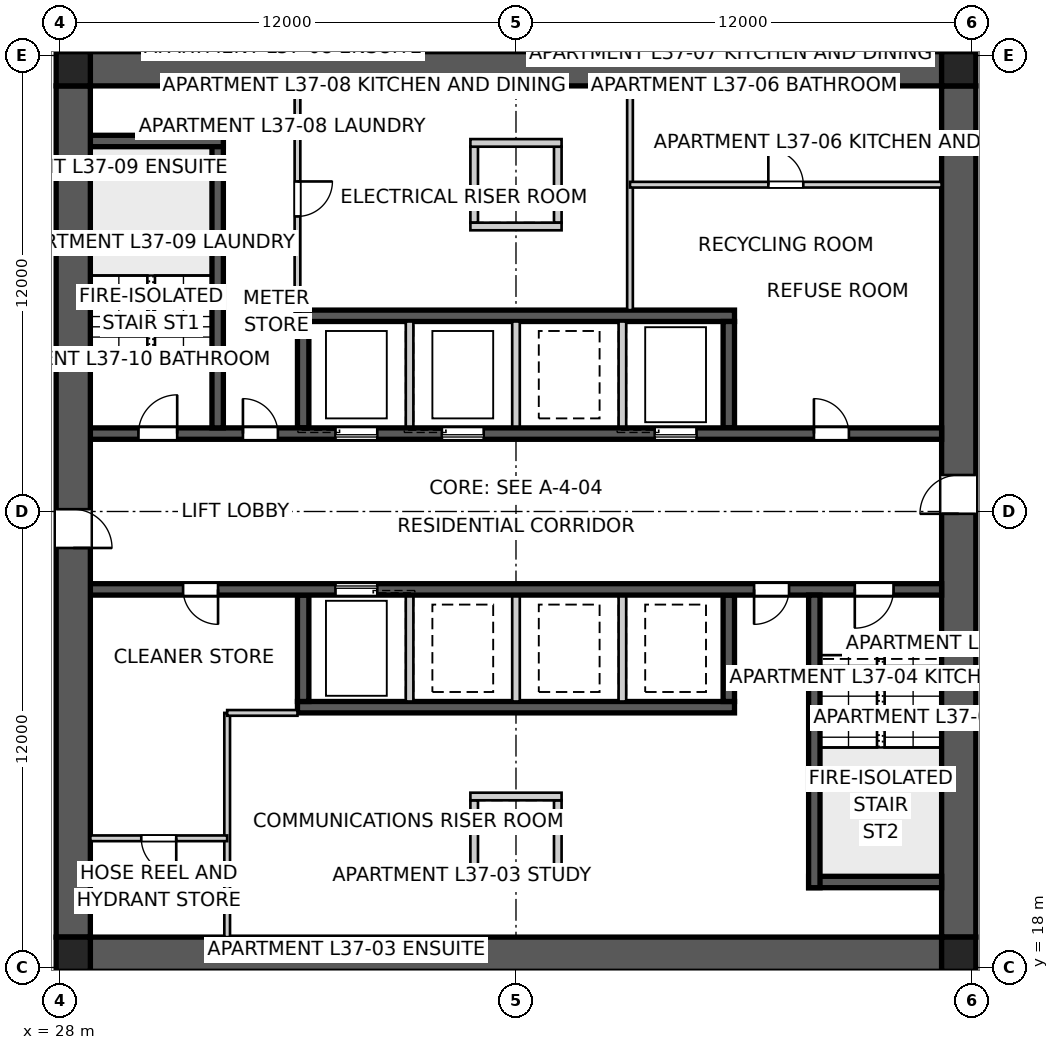
"""IFC4 building model, lengths in metres.
Left out: names, types, materials, properties, quantities, classifications, styles, units other than length and angle.
Written with IfcOpenShell. Run it as: python <this file> out.ifc"""

import sys

from ifc_helpers import new_model, si_unit, direction, frame, frame_2d, origin, origin_2d, place, context, subcontext, project, spatial, polyline, rectangle, outline, extrude, element, fill, save


model = new_model("IFC4")
c1 = context("Model", 3, precision=1e-05, world=origin(), true_north=direction((0.0, 1.0)))
c2 = subcontext(c1, "Body", "Model", "MODEL_VIEW")
j1 = project(units=[si_unit("LENGTHUNIT", "METRE"), si_unit("PLANEANGLEUNIT", "RADIAN")], contexts=[c1])
p1 = place(None, origin())
s1 = spatial("IfcSite", under=j1, at=p1, CompositionType="ELEMENT")
p2 = place(p1, origin())
s2 = spatial("IfcBuilding", under=s1, at=p2, CompositionType="ELEMENT")
p3 = place(p2, frame((0.0, 0.0, 135.4)))
s3 = spatial("IfcBuildingStorey", under=s2, at=p3, CompositionType="ELEMENT", Elevation=135.4)
for number, where, z_axis, x_axis in (
    (1, (28.8, 41.65, 0.0), (0.0, 0.0, 1.0), (1.0, 0.0, 0.0)),
    (2, (51.2, 18.35, 0.0), (0.0, 0.0, 1.0), (-1.0, 0.0, 0.0)),
):
    element("IfcWall", number, at=place(p3, frame(where, z_axis=z_axis, x_axis=x_axis)), inside=s3, PredefinedType="SHEAR", context=c2, shape_type="SweptSolid", body=[
        extrude(outline(polyline([(0.0, -0.45), (22.4, -0.45), (22.4, -0.025), (22.85, -0.025), (22.85, 0.025), (22.4, 0.025), (22.4, 0.45), (0.0, 0.45), (0.0, 0.025), (-0.45, 0.025), (-0.45, -0.025), (0.0, -0.025), (0.0, -0.45)])), origin(), (0.0, 0.0, 1.0), 3.4),
    ])
p4 = place(p3, frame((51.65, 18.8, 0.0), z_axis=(0.0, 0.0, 1.0), x_axis=(0.0, 1.0, 0.0)))
e3 = element("IfcWall", 3, at=p4, inside=s3, PredefinedType="SHEAR", context=c2, shape_type="SweptSolid", body=[
    extrude(outline(polyline([(0.0, -0.45), (22.4, -0.45), (22.4, -0.025), (22.85, -0.025), (22.85, 0.025), (22.4, 0.025), (22.4, 0.45), (0.0, 0.45), (0.0, 0.025), (-0.45, 0.025), (-0.45, -0.025), (0.0, -0.025), (0.0, -0.45)])), origin(), (0.0, 0.0, 1.0), 3.4),
])
p5 = place(p4, frame((11.14, 0.0, 0.0)))
e4 = element("IfcOpeningElement", 4, at=p5, cuts=e3, PredefinedType="OPENING", context=c2, shape_type="SweptSolid", body=[
    extrude(rectangle(XDim=1.02, YDim=2.4, at=frame_2d((0.51, 1.2))), frame((0.0, 0.46, 0.0), z_axis=(0.0, -1.0, 0.0), x_axis=(1.0, 0.0, 0.0)), (0.0, 0.0, 1.0), 0.92),
])
p6 = place(p3, frame((28.35, 41.2, 0.0), z_axis=(0.0, 0.0, 1.0), x_axis=(0.0, -1.0, 0.0)))
e5 = element("IfcWall", 5, at=p6, inside=s3, PredefinedType="SHEAR", context=c2, shape_type="SweptSolid", body=[
    extrude(outline(polyline([(0.0, -0.45), (22.4, -0.45), (22.4, -0.025), (22.85, -0.025), (22.85, 0.025), (22.4, 0.025), (22.4, 0.45), (0.0, 0.45), (0.0, 0.025), (-0.45, 0.025), (-0.45, -0.025), (0.0, -0.025), (0.0, -0.45)])), origin(), (0.0, 0.0, 1.0), 3.4),
])
p7 = place(p6, frame((11.14, 0.0, 0.0)))
e6 = element("IfcOpeningElement", 6, at=p7, cuts=e5, PredefinedType="OPENING", context=c2, shape_type="SweptSolid", body=[
    extrude(rectangle(XDim=1.02, YDim=2.4, at=frame_2d((0.51, 1.2))), frame((0.0, 0.46, 0.0), z_axis=(0.0, -1.0, 0.0), x_axis=(1.0, 0.0, 0.0)), (0.0, 0.0, 1.0), 0.92),
])
p8 = place(p3, frame((28.8, 32.05, 0.0), z_axis=(0.0, 0.0, 1.0), x_axis=(1.0, 0.0, 0.0)))
e7 = element("IfcWall", 7, at=p8, inside=s3, PredefinedType="SHEAR", context=c2, shape_type="SweptSolid", body=[
    extrude(rectangle(XDim=22.4, YDim=0.3, at=frame_2d((11.2, 0.0))), origin(), (0.0, 0.0, 1.0), 3.4),
])
p9 = place(p8, frame((19.04, 0.0, 0.0)))
e8 = element("IfcOpeningElement", 8, at=p9, cuts=e7, PredefinedType="OPENING", context=c2, shape_type="SweptSolid", body=[
    extrude(rectangle(XDim=0.92, YDim=2.1, at=frame_2d((0.46, 1.05))), frame((0.0, 0.16, 0.0), z_axis=(0.0, -1.0, 0.0), x_axis=(1.0, 0.0, 0.0)), (0.0, 0.0, 1.0), 0.32),
])
p10 = place(p8, frame((1.265, 0.0, 0.0)))
e9 = element("IfcOpeningElement", 9, at=p10, cuts=e7, PredefinedType="OPENING", context=c2, shape_type="SweptSolid", body=[
    extrude(rectangle(XDim=1.02, YDim=2.1, at=frame_2d((0.51, 1.05))), frame((0.0, 0.16, 0.0), z_axis=(0.0, -1.0, 0.0), x_axis=(1.0, 0.0, 0.0)), (0.0, 0.0, 1.0), 0.32),
])
p11 = place(p8, frame((4.015, 0.0, 0.0)))
e10 = element("IfcOpeningElement", 10, at=p11, cuts=e7, PredefinedType="OPENING", context=c2, shape_type="SweptSolid", body=[
    extrude(rectangle(XDim=0.92, YDim=2.1, at=frame_2d((0.46, 1.05))), frame((0.0, 0.16, 0.0), z_axis=(0.0, -1.0, 0.0), x_axis=(1.0, 0.0, 0.0)), (0.0, 0.0, 1.0), 0.32),
])
p12 = place(p8, frame((6.45, 0.0, 0.0)))
e11 = element("IfcOpeningElement", 11, at=p12, cuts=e7, PredefinedType="OPENING", context=c2, shape_type="SweptSolid", body=[
    extrude(rectangle(XDim=1.1, YDim=2.1, at=frame_2d((0.55, 1.05))), frame((0.0, 0.16, 0.0), z_axis=(0.0, -1.0, 0.0), x_axis=(1.0, 0.0, 0.0)), (0.0, 0.0, 1.0), 0.32),
])
p13 = place(p8, frame((9.25, 0.0, 0.0)))
e12 = element("IfcOpeningElement", 12, at=p13, cuts=e7, PredefinedType="OPENING", context=c2, shape_type="SweptSolid", body=[
    extrude(rectangle(XDim=1.1, YDim=2.1, at=frame_2d((0.55, 1.05))), frame((0.0, 0.16, 0.0), z_axis=(0.0, -1.0, 0.0), x_axis=(1.0, 0.0, 0.0)), (0.0, 0.0, 1.0), 0.32),
])
p14 = place(p8, frame((14.85, 0.0, 0.0)))
e13 = element("IfcOpeningElement", 13, at=p14, cuts=e7, PredefinedType="OPENING", context=c2, shape_type="SweptSolid", body=[
    extrude(rectangle(XDim=1.1, YDim=2.1, at=frame_2d((0.55, 1.05))), frame((0.0, 0.16, 0.0), z_axis=(0.0, -1.0, 0.0), x_axis=(1.0, 0.0, 0.0)), (0.0, 0.0, 1.0), 0.32),
])
p15 = place(p3, frame((51.2, 27.95, 0.0), z_axis=(0.0, 0.0, 1.0), x_axis=(-1.0, 0.0, 0.0)))
e14 = element("IfcWall", 14, at=p15, inside=s3, PredefinedType="SHEAR", context=c2, shape_type="SweptSolid", body=[
    extrude(rectangle(XDim=22.4, YDim=0.3, at=frame_2d((11.2, 0.0))), origin(), (0.0, 0.0, 1.0), 3.4),
])
p16 = place(p15, frame((19.04, 0.0, 0.0)))
e15 = element("IfcOpeningElement", 15, at=p16, cuts=e14, PredefinedType="OPENING", context=c2, shape_type="SweptSolid", body=[
    extrude(rectangle(XDim=0.92, YDim=2.1, at=frame_2d((0.46, 1.05))), frame((0.0, 0.16, 0.0), z_axis=(0.0, -1.0, 0.0), x_axis=(1.0, 0.0, 0.0)), (0.0, 0.0, 1.0), 0.32),
])
p17 = place(p15, frame((1.265, 0.0, 0.0)))
e16 = element("IfcOpeningElement", 16, at=p17, cuts=e14, PredefinedType="OPENING", context=c2, shape_type="SweptSolid", body=[
    extrude(rectangle(XDim=1.02, YDim=2.1, at=frame_2d((0.51, 1.05))), frame((0.0, 0.16, 0.0), z_axis=(0.0, -1.0, 0.0), x_axis=(1.0, 0.0, 0.0)), (0.0, 0.0, 1.0), 0.32),
])
p18 = place(p15, frame((4.015, 0.0, 0.0)))
e17 = element("IfcOpeningElement", 17, at=p18, cuts=e14, PredefinedType="OPENING", context=c2, shape_type="SweptSolid", body=[
    extrude(rectangle(XDim=0.92, YDim=2.1, at=frame_2d((0.46, 1.05))), frame((0.0, 0.16, 0.0), z_axis=(0.0, -1.0, 0.0), x_axis=(1.0, 0.0, 0.0)), (0.0, 0.0, 1.0), 0.32),
])
p19 = place(p15, frame((14.85, 0.0, 0.0)))
e18 = element("IfcOpeningElement", 18, at=p19, cuts=e14, PredefinedType="OPENING", context=c2, shape_type="SweptSolid", body=[
    extrude(rectangle(XDim=1.1, YDim=2.1, at=frame_2d((0.55, 1.05))), frame((0.0, 0.16, 0.0), z_axis=(0.0, -1.0, 0.0), x_axis=(1.0, 0.0, 0.0)), (0.0, 0.0, 1.0), 0.32),
])
for number, where, z_axis, x_axis in (
    (19, (34.25, 35.15, 0.0), (0.0, 0.0, 1.0), (1.0, 0.0, 0.0)),
    (20, (45.75, 24.85, 0.0), (0.0, 0.0, 1.0), (-1.0, 0.0, 0.0)),
):
    element("IfcWall", number, at=place(p3, frame(where, z_axis=z_axis, x_axis=x_axis)), inside=s3, PredefinedType="SHEAR", context=c2, shape_type="SweptSolid", body=[
        extrude(rectangle(XDim=11.5, YDim=0.3, at=frame_2d((5.75, 0.0))), origin(), (0.0, 0.0, 1.0), 3.4),
    ])
for number, where, z_axis, x_axis in (
    (21, (34.4, 32.2, 0.0), (0.0, 0.0, 1.0), (0.0, 1.0, 0.0)),
    (22, (45.6, 27.8, 0.0), (0.0, 0.0, 1.0), (0.0, -1.0, 0.0)),
):
    element("IfcWall", number, at=place(p3, frame(where, z_axis=z_axis, x_axis=x_axis)), inside=s3, PredefinedType="SHEAR", context=c2, shape_type="SweptSolid", body=[
        extrude(rectangle(XDim=2.8, YDim=0.3, at=frame_2d((1.4, 0.0))), origin(), (0.0, 0.0, 1.0), 3.4),
    ])
for number, where, z_axis, x_axis in (
    (23, (37.2, 32.2, 0.0), (0.0, 0.0, 1.0), (0.0, 1.0, 0.0)),
    (24, (42.8, 27.8, 0.0), (0.0, 0.0, 1.0), (0.0, -1.0, 0.0)),
    (25, (40.0, 32.2, 0.0), (0.0, 0.0, 1.0), (0.0, 1.0, 0.0)),
    (26, (40.0, 27.8, 0.0), (0.0, 0.0, 1.0), (0.0, -1.0, 0.0)),
    (27, (42.8, 32.2, 0.0), (0.0, 0.0, 1.0), (0.0, 1.0, 0.0)),
    (28, (37.2, 27.8, 0.0), (0.0, 0.0, 1.0), (0.0, -1.0, 0.0)),
):
    element("IfcWall", number, at=place(p3, frame(where, z_axis=z_axis, x_axis=x_axis)), inside=s3, PredefinedType="SOLIDWALL", context=c2, shape_type="SweptSolid", body=[
        extrude(rectangle(XDim=2.8, YDim=0.2, at=frame_2d((1.4, 0.0))), origin(), (0.0, 0.0, 1.0), 3.4),
    ])
for number, where, z_axis, x_axis in (
    (29, (45.6, 32.2, 0.0), (0.0, 0.0, 1.0), (0.0, 1.0, 0.0)),
    (30, (34.4, 27.8, 0.0), (0.0, 0.0, 1.0), (0.0, -1.0, 0.0)),
):
    element("IfcWall", number, at=place(p3, frame(where, z_axis=z_axis, x_axis=x_axis)), inside=s3, PredefinedType="SHEAR", context=c2, shape_type="SweptSolid", body=[
        extrude(rectangle(XDim=2.8, YDim=0.3, at=frame_2d((1.4, 0.0))), origin(), (0.0, 0.0, 1.0), 3.4),
    ])
p20 = place(p3, frame((32.15, 32.2, 0.0), z_axis=(0.0, 0.0, 1.0), x_axis=(0.0, 1.0, 0.0)))
e31 = element("IfcWall", 31, at=p20, inside=s3, PredefinedType="SHEAR", context=c2, shape_type="SweptSolid", body=[
    extrude(rectangle(XDim=7.7, YDim=0.3, at=frame_2d((3.85, 0.0))), origin(), (0.0, 0.0, 1.0), 3.4),
])
p21 = place(p3, frame((28.8, 39.75, 0.0), z_axis=(0.0, 0.0, 1.0), x_axis=(1.0, 0.0, 0.0)))
e32 = element("IfcWall", 32, at=p21, inside=s3, PredefinedType="SHEAR", context=c2, shape_type="SweptSolid", body=[
    extrude(rectangle(XDim=3.5, YDim=0.3, at=frame_2d((1.75, 0.0))), origin(), (0.0, 0.0, 1.0), 3.4),
])
p22 = place(p3, frame((47.85, 27.8, 0.0), z_axis=(0.0, 0.0, 1.0), x_axis=(0.0, -1.0, 0.0)))
e33 = element("IfcWall", 33, at=p22, inside=s3, PredefinedType="SHEAR", context=c2, shape_type="SweptSolid", body=[
    extrude(rectangle(XDim=7.7, YDim=0.3, at=frame_2d((3.85, 0.0))), origin(), (0.0, 0.0, 1.0), 3.4),
])
p23 = place(p3, frame((51.2, 20.25, 0.0), z_axis=(0.0, 0.0, 1.0), x_axis=(-1.0, 0.0, 0.0)))
e34 = element("IfcWall", 34, at=p23, inside=s3, PredefinedType="SHEAR", context=c2, shape_type="SweptSolid", body=[
    extrude(rectangle(XDim=3.5, YDim=0.3, at=frame_2d((1.75, 0.0))), origin(), (0.0, 0.0, 1.0), 3.4),
])
for number, where, z_axis, x_axis in (
    (35, (38.9, 37.6, 0.0), (0.0, 0.0, 1.0), (0.0, 1.0, 0.0)),
    (36, (41.1, 37.6, 0.0), (0.0, 0.0, 1.0), (0.0, 1.0, 0.0)),
):
    element("IfcWall", number, at=place(p3, frame(where, z_axis=z_axis, x_axis=x_axis)), inside=s3, PredefinedType="SOLIDWALL", context=c2, shape_type="SweptSolid", body=[
        extrude(rectangle(XDim=2.0, YDim=0.2, at=frame_2d((1.0, 0.0))), origin(), (0.0, 0.0, 1.0), 3.4),
    ])
for number, where, z_axis, x_axis in (
    (37, (38.8, 37.5, 0.0), (0.0, 0.0, 1.0), (1.0, 0.0, 0.0)),
    (38, (38.8, 39.7, 0.0), (0.0, 0.0, 1.0), (1.0, 0.0, 0.0)),
):
    element("IfcWall", number, at=place(p3, frame(where, z_axis=z_axis, x_axis=x_axis)), inside=s3, PredefinedType="SOLIDWALL", context=c2, shape_type="SweptSolid", body=[
        extrude(rectangle(XDim=2.4, YDim=0.2, at=frame_2d((1.2, 0.0))), origin(), (0.0, 0.0, 1.0), 3.4),
    ])
for number, where, z_axis, x_axis in (
    (39, (38.9, 22.4, 0.0), (0.0, 0.0, 1.0), (0.0, -1.0, 0.0)),
    (40, (41.1, 22.4, 0.0), (0.0, 0.0, 1.0), (0.0, -1.0, 0.0)),
):
    element("IfcWall", number, at=place(p3, frame(where, z_axis=z_axis, x_axis=x_axis)), inside=s3, PredefinedType="SOLIDWALL", context=c2, shape_type="SweptSolid", body=[
        extrude(rectangle(XDim=2.0, YDim=0.2, at=frame_2d((1.0, 0.0))), origin(), (0.0, 0.0, 1.0), 3.4),
    ])
for number, where, z_axis, x_axis in (
    (41, (38.8, 22.5, 0.0), (0.0, 0.0, 1.0), (1.0, 0.0, 0.0)),
    (42, (38.8, 20.3, 0.0), (0.0, 0.0, 1.0), (1.0, 0.0, 0.0)),
):
    element("IfcWall", number, at=place(p3, frame(where, z_axis=z_axis, x_axis=x_axis)), inside=s3, PredefinedType="SOLIDWALL", context=c2, shape_type="SweptSolid", body=[
        extrude(rectangle(XDim=2.4, YDim=0.2, at=frame_2d((1.2, 0.0))), origin(), (0.0, 0.0, 1.0), 3.4),
    ])
for number, where, z_axis, x_axis in (
    (43, (28.35, 18.35, 0.0), (0.0, 0.0, 1.0), (1.0, 0.0, 0.0)),
    (44, (51.65, 18.35, 0.0), (0.0, 0.0, 1.0), (1.0, 0.0, 0.0)),
    (45, (51.65, 41.65, 0.0), (0.0, 0.0, 1.0), (1.0, 0.0, 0.0)),
    (46, (28.35, 41.65, 0.0), (0.0, 0.0, 1.0), (1.0, 0.0, 0.0)),
):
    element("IfcColumn", number, at=place(p3, frame(where, z_axis=z_axis, x_axis=x_axis)), inside=s3, PredefinedType="COLUMN", context=c2, shape_type="SweptSolid", body=[
        extrude(rectangle(XDim=0.9, YDim=0.9, at=origin_2d()), origin(), (0.0, 0.0, 1.0), 3.4),
    ])
p24 = place(p3, frame((34.25, 41.2, 0.0), z_axis=(0.0, 0.0, 1.0), x_axis=(0.0, -1.0, 0.0)))
e47 = element("IfcWall", 47, at=p24, inside=s3, PredefinedType="SOLIDWALL", context=c2, shape_type="SweptSolid", body=[
    extrude(rectangle(XDim=5.95, YDim=0.15, at=frame_2d((2.975, 0.0))), origin(), (0.0, 0.0, 1.0), 3.2),
])
p25 = place(p24, frame((2.515, 0.0, 0.0)))
e48 = element("IfcOpeningElement", 48, at=p25, cuts=e47, PredefinedType="OPENING", context=c2, shape_type="SweptSolid", body=[
    extrude(rectangle(XDim=0.92, YDim=2.1, at=frame_2d((0.46, 1.05))), frame((0.0, 0.085, 0.0), z_axis=(0.0, -1.0, 0.0), x_axis=(1.0, 0.0, 0.0)), (0.0, 0.0, 1.0), 0.17),
])
p26 = place(p3, frame((43.0, 41.2, 0.0), z_axis=(0.0, 0.0, 1.0), x_axis=(0.0, -1.0, 0.0)))
e49 = element("IfcWall", 49, at=p26, inside=s3, PredefinedType="SOLIDWALL", context=c2, shape_type="SweptSolid", body=[
    extrude(rectangle(XDim=5.9, YDim=0.15, at=frame_2d((2.95, 0.0))), origin(), (0.0, 0.0, 1.0), 3.2),
])
p27 = place(p3, frame((43.0, 38.6, 0.0), z_axis=(0.0, 0.0, 1.0), x_axis=(1.0, 0.0, 0.0)))
e50 = element("IfcWall", 50, at=p27, inside=s3, PredefinedType="SOLIDWALL", context=c2, shape_type="SweptSolid", body=[
    extrude(rectangle(XDim=8.2, YDim=0.15, at=frame_2d((4.1, 0.0))), origin(), (0.0, 0.0, 1.0), 3.2),
])
p28 = place(p27, frame((3.64, 0.0, 0.0)))
e51 = element("IfcOpeningElement", 51, at=p28, cuts=e50, PredefinedType="OPENING", context=c2, shape_type="SweptSolid", body=[
    extrude(rectangle(XDim=0.92, YDim=2.1, at=frame_2d((0.46, 1.05))), frame((0.0, 0.085, 0.0), z_axis=(0.0, -1.0, 0.0), x_axis=(1.0, 0.0, 0.0)), (0.0, 0.0, 1.0), 0.17),
])
p29 = place(p3, frame((32.4, 18.8, 0.0), z_axis=(0.0, 0.0, 1.0), x_axis=(0.0, 1.0, 0.0)))
e52 = element("IfcWall", 52, at=p29, inside=s3, PredefinedType="SOLIDWALL", context=c2, shape_type="SweptSolid", body=[
    extrude(rectangle(XDim=5.9, YDim=0.15, at=frame_2d((2.95, 0.0))), origin(), (0.0, 0.0, 1.0), 3.2),
])
p30 = place(p3, frame((32.4, 24.7, 0.0), z_axis=(0.0, 0.0, 1.0), x_axis=(1.0, 0.0, 0.0)))
e53 = element("IfcWall", 53, at=p30, inside=s3, PredefinedType="SOLIDWALL", context=c2, shape_type="SweptSolid", body=[
    extrude(rectangle(XDim=1.85, YDim=0.15, at=frame_2d((0.925, 0.0))), origin(), (0.0, 0.0, 1.0), 3.2),
])
p31 = place(p3, frame((32.4, 21.4, 0.0), z_axis=(0.0, 0.0, 1.0), x_axis=(-1.0, 0.0, 0.0)))
e54 = element("IfcWall", 54, at=p31, inside=s3, PredefinedType="SOLIDWALL", context=c2, shape_type="SweptSolid", body=[
    extrude(rectangle(XDim=3.6, YDim=0.15, at=frame_2d((1.8, 0.0))), origin(), (0.0, 0.0, 1.0), 3.2),
])
p32 = place(p31, frame((1.34, 0.0, 0.0)))
e55 = element("IfcOpeningElement", 55, at=p32, cuts=e54, PredefinedType="OPENING", context=c2, shape_type="SweptSolid", body=[
    extrude(rectangle(XDim=0.92, YDim=2.1, at=frame_2d((0.46, 1.05))), frame((0.0, 0.085, 0.0), z_axis=(0.0, -1.0, 0.0), x_axis=(1.0, 0.0, 0.0)), (0.0, 0.0, 1.0), 0.17),
])
p33 = place(p9, origin())
e56 = element("IfcDoor", 56, at=p33, inside=s3, OperationType="SINGLE_SWING_LEFT", PredefinedType="DOOR", context=c2, shape_type="SweptSolid", body=[
    extrude(rectangle(XDim=0.92, YDim=2.1, at=frame_2d((0.46, 1.05))), frame((0.0, 0.025, 0.0), z_axis=(0.0, -1.0, 0.0), x_axis=(1.0, 0.0, 0.0)), (0.0, 0.0, 1.0), 0.05),
])
fill(e8, e56)
p34 = place(p16, origin())
e57 = element("IfcDoor", 57, at=p34, inside=s3, OperationType="SINGLE_SWING_LEFT", PredefinedType="DOOR", context=c2, shape_type="SweptSolid", body=[
    extrude(rectangle(XDim=0.92, YDim=2.1, at=frame_2d((0.46, 1.05))), frame((0.0, 0.025, 0.0), z_axis=(0.0, -1.0, 0.0), x_axis=(1.0, 0.0, 0.0)), (0.0, 0.0, 1.0), 0.05),
])
fill(e15, e57)
p35 = place(p17, origin())
e58 = element("IfcDoor", 58, at=p35, inside=s3, OperationType="SINGLE_SWING_RIGHT", PredefinedType="DOOR", context=c2, shape_type="SweptSolid", body=[
    extrude(rectangle(XDim=1.02, YDim=2.1, at=frame_2d((0.51, 1.05))), frame((0.0, 0.025, 0.0), z_axis=(0.0, -1.0, 0.0), x_axis=(1.0, 0.0, 0.0)), (0.0, 0.0, 1.0), 0.05),
])
fill(e16, e58)
p36 = place(p10, origin())
e59 = element("IfcDoor", 59, at=p36, inside=s3, OperationType="SINGLE_SWING_RIGHT", PredefinedType="DOOR", context=c2, shape_type="SweptSolid", body=[
    extrude(rectangle(XDim=1.02, YDim=2.1, at=frame_2d((0.51, 1.05))), frame((0.0, 0.025, 0.0), z_axis=(0.0, -1.0, 0.0), x_axis=(1.0, 0.0, 0.0)), (0.0, 0.0, 1.0), 0.05),
])
fill(e9, e59)
p37 = place(p11, origin())
e60 = element("IfcDoor", 60, at=p37, inside=s3, OperationType="SINGLE_SWING_LEFT", PredefinedType="DOOR", context=c2, shape_type="SweptSolid", body=[
    extrude(rectangle(XDim=0.92, YDim=2.1, at=frame_2d((0.46, 1.05))), frame((0.0, 0.025, 0.0), z_axis=(0.0, -1.0, 0.0), x_axis=(1.0, 0.0, 0.0)), (0.0, 0.0, 1.0), 0.05),
])
fill(e10, e60)
p38 = place(p18, origin())
e61 = element("IfcDoor", 61, at=p38, inside=s3, OperationType="SINGLE_SWING_RIGHT", PredefinedType="DOOR", context=c2, shape_type="SweptSolid", body=[
    extrude(rectangle(XDim=0.92, YDim=2.1, at=frame_2d((0.46, 1.05))), frame((0.0, 0.025, 0.0), z_axis=(0.0, -1.0, 0.0), x_axis=(1.0, 0.0, 0.0)), (0.0, 0.0, 1.0), 0.05),
])
fill(e17, e61)
p39 = place(p28, origin())
e62 = element("IfcDoor", 62, at=p39, inside=s3, OperationType="SINGLE_SWING_LEFT", PredefinedType="DOOR", context=c2, shape_type="SweptSolid", body=[
    extrude(rectangle(XDim=0.92, YDim=2.1, at=frame_2d((0.46, 1.05))), frame((0.0, 0.025, 0.0), z_axis=(0.0, -1.0, 0.0), x_axis=(1.0, 0.0, 0.0)), (0.0, 0.0, 1.0), 0.05),
])
fill(e51, e62)
p40 = place(p32, origin())
e63 = element("IfcDoor", 63, at=p40, inside=s3, OperationType="SINGLE_SWING_LEFT", PredefinedType="DOOR", context=c2, shape_type="SweptSolid", body=[
    extrude(rectangle(XDim=0.92, YDim=2.1, at=frame_2d((0.46, 1.05))), frame((0.0, 0.025, 0.0), z_axis=(0.0, -1.0, 0.0), x_axis=(1.0, 0.0, 0.0)), (0.0, 0.0, 1.0), 0.05),
])
fill(e55, e63)
p41 = place(p25, origin())
e64 = element("IfcDoor", 64, at=p41, inside=s3, OperationType="SINGLE_SWING_LEFT", PredefinedType="DOOR", context=c2, shape_type="SweptSolid", body=[
    extrude(rectangle(XDim=0.92, YDim=2.1, at=frame_2d((0.46, 1.05))), frame((0.0, 0.025, 0.0), z_axis=(0.0, -1.0, 0.0), x_axis=(1.0, 0.0, 0.0)), (0.0, 0.0, 1.0), 0.05),
])
fill(e48, e64)
p42 = place(p5, origin())
e65 = element("IfcDoor", 65, at=p42, inside=s3, OperationType="SINGLE_SWING_LEFT", PredefinedType="DOOR", context=c2, shape_type="SweptSolid", body=[
    extrude(rectangle(XDim=1.02, YDim=2.4, at=frame_2d((0.51, 1.2))), frame((0.0, 0.025, 0.0), z_axis=(0.0, -1.0, 0.0), x_axis=(1.0, 0.0, 0.0)), (0.0, 0.0, 1.0), 0.05),
])
fill(e4, e65)
p43 = place(p7, origin())
e66 = element("IfcDoor", 66, at=p43, inside=s3, OperationType="SINGLE_SWING_RIGHT", PredefinedType="DOOR", context=c2, shape_type="SweptSolid", body=[
    extrude(rectangle(XDim=1.02, YDim=2.4, at=frame_2d((0.51, 1.2))), frame((0.0, 0.025, 0.0), z_axis=(0.0, -1.0, 0.0), x_axis=(1.0, 0.0, 0.0)), (0.0, 0.0, 1.0), 0.05),
])
fill(e6, e66)
p44 = place(p12, origin())
e67 = element("IfcDoor", 67, at=p44, inside=s3, OperationType="SLIDING_TO_LEFT", PredefinedType="DOOR", context=c2, shape_type="SweptSolid", body=[
    extrude(rectangle(XDim=1.1, YDim=2.1, at=frame_2d((0.55, 1.05))), frame((0.0, 0.025, 0.0), z_axis=(0.0, -1.0, 0.0), x_axis=(1.0, 0.0, 0.0)), (0.0, 0.0, 1.0), 0.05),
])
fill(e11, e67)
p45 = place(p13, origin())
e68 = element("IfcDoor", 68, at=p45, inside=s3, OperationType="SLIDING_TO_LEFT", PredefinedType="DOOR", context=c2, shape_type="SweptSolid", body=[
    extrude(rectangle(XDim=1.1, YDim=2.1, at=frame_2d((0.55, 1.05))), frame((0.0, 0.025, 0.0), z_axis=(0.0, -1.0, 0.0), x_axis=(1.0, 0.0, 0.0)), (0.0, 0.0, 1.0), 0.05),
])
fill(e12, e68)
p46 = place(p14, origin())
e69 = element("IfcDoor", 69, at=p46, inside=s3, OperationType="SLIDING_TO_LEFT", PredefinedType="DOOR", context=c2, shape_type="SweptSolid", body=[
    extrude(rectangle(XDim=1.1, YDim=2.1, at=frame_2d((0.55, 1.05))), frame((0.0, 0.025, 0.0), z_axis=(0.0, -1.0, 0.0), x_axis=(1.0, 0.0, 0.0)), (0.0, 0.0, 1.0), 0.05),
])
fill(e13, e69)
p47 = place(p19, origin())
e70 = element("IfcDoor", 70, at=p47, inside=s3, OperationType="SLIDING_TO_LEFT", PredefinedType="DOOR", context=c2, shape_type="SweptSolid", body=[
    extrude(rectangle(XDim=1.1, YDim=2.1, at=frame_2d((0.55, 1.05))), frame((0.0, 0.025, 0.0), z_axis=(0.0, -1.0, 0.0), x_axis=(1.0, 0.0, 0.0)), (0.0, 0.0, 1.0), 0.05),
])
fill(e18, e70)
save(model, sys.argv[1])
